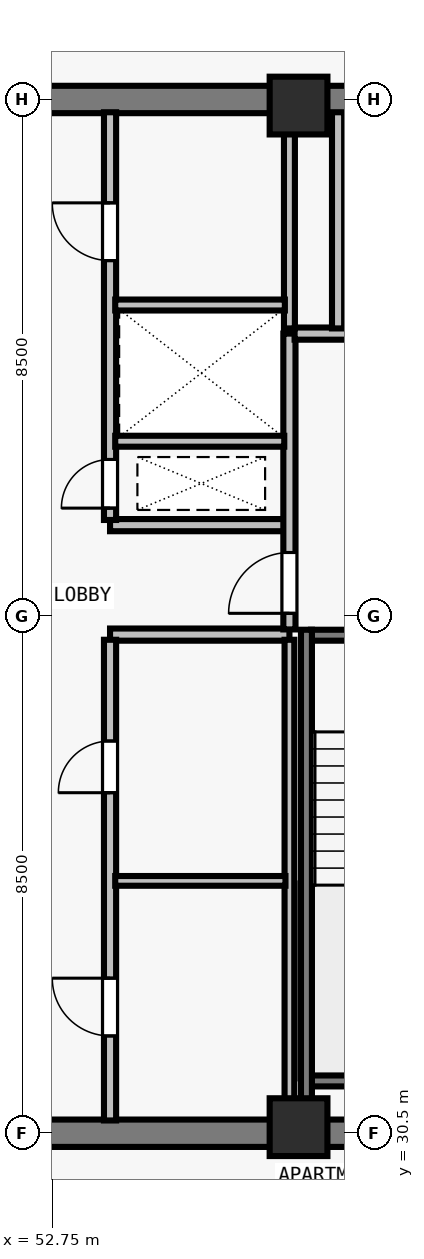
"""IFC4 building model, lengths in metres.
Left out: names, types, materials, properties, quantities, classifications, styles, units other than length and angle.
Written with IfcOpenShell. Run it as: python <this file> out.ifc"""

import sys

from ifc_helpers import new_model, si_unit, direction, frame, frame_2d, origin, origin_2d, place, context, subcontext, project, spatial, rectangle, extrude, element, fill, save


model = new_model("IFC4")
c1 = context("Model", 3, precision=1e-05, world=origin(), true_north=direction((0.0, 1.0)))
c2 = subcontext(c1, "Body", "Model", "MODEL_VIEW")
j1 = project(units=[si_unit("LENGTHUNIT", "METRE"), si_unit("PLANEANGLEUNIT", "RADIAN")], contexts=[c1])
p1 = place(None, origin())
s1 = spatial("IfcSite", under=j1, at=p1, CompositionType="ELEMENT")
p2 = place(p1, origin())
s2 = spatial("IfcBuilding", under=s1, at=p2, CompositionType="ELEMENT")
p3 = place(p2, frame((0.0, 0.0, 220.0)))
s3 = spatial("IfcBuildingStorey", under=s2, at=p3, CompositionType="ELEMENT", Elevation=220.0)
for number, where, z_axis, x_axis in (
    (1, (56.8, 30.6, 0.0), (0.0, 0.0, 1.0), (1.0, 0.0, 0.0)),
    (2, (56.8, 47.4, 0.0), (0.0, 0.0, 1.0), (1.0, 0.0, 0.0)),
):
    element("IfcColumn", number, at=place(p3, frame(where, z_axis=z_axis, x_axis=x_axis)), inside=s3, PredefinedType="COLUMN", context=c2, shape_type="SweptSolid", body=[
        extrude(rectangle(XDim=0.95, YDim=0.95, at=origin_2d()), origin(), (0.0, 0.0, 1.0), 3.5),
    ])
for number, where, z_axis, x_axis in (
    (3, (43.275, 30.5, 0.0), (0.0, 0.0, 1.0), (1.0, 0.0, 0.0)),
    (4, (43.275, 47.5, 0.0), (0.0, 0.0, 1.0), (1.0, 0.0, 0.0)),
):
    element("IfcWall", number, at=place(p3, frame(where, z_axis=z_axis, x_axis=x_axis)), inside=s3, PredefinedType="SHEAR", context=c2, shape_type="SweptSolid", body=[
        extrude(rectangle(XDim=17.45, YDim=0.45, at=frame_2d((8.725, 0.0))), origin(), (0.0, 0.0, 1.0), 3.29),
    ])
for number, where, z_axis, x_axis in (
    (5, (53.7, 38.7, 0.0), (0.0, 0.0, 1.0), (1.0, 0.0, 0.0)),
    (6, (53.7, 40.5, 0.0), (0.0, 0.0, 1.0), (1.0, 0.0, 0.0)),
):
    element("IfcWall", number, at=place(p3, frame(where, z_axis=z_axis, x_axis=x_axis)), inside=s3, PredefinedType="SOLIDWALL", context=c2, shape_type="SweptSolid", body=[
        extrude(rectangle(XDim=2.95, YDim=0.2, at=frame_2d((1.475, 0.0))), origin(), (0.0, 0.0, 1.0), 3.29),
    ])
p4 = place(p3, frame((53.7, 30.71, 0.0), z_axis=(0.0, 0.0, 1.0), x_axis=(0.0, 1.0, 0.0)))
e7 = element("IfcWall", 7, at=p4, inside=s3, PredefinedType="SOLIDWALL", context=c2, shape_type="SweptSolid", body=[
    extrude(rectangle(XDim=7.905, YDim=0.2, at=frame_2d((3.953, 0.0))), origin(), (0.0, 0.0, 1.0), 3.29),
])
p5 = place(p4, frame((1.39, 0.0, 0.0)))
e8 = element("IfcOpeningElement", 8, at=p5, cuts=e7, PredefinedType="OPENING", context=c2, shape_type="SweptSolid", body=[
    extrude(rectangle(XDim=0.95, YDim=2.12, at=frame_2d((0.475, 1.06))), frame((0.0, 0.11, 0.0), z_axis=(0.0, -1.0, 0.0), x_axis=(1.0, 0.0, 0.0)), (0.0, 0.0, 1.0), 0.22),
])
p6 = place(p4, frame((5.39, 0.0, 0.0)))
e9 = element("IfcOpeningElement", 9, at=p6, cuts=e7, PredefinedType="OPENING", context=c2, shape_type="SweptSolid", body=[
    extrude(rectangle(XDim=0.85, YDim=2.12, at=frame_2d((0.425, 1.06))), frame((0.0, 0.11, 0.0), z_axis=(0.0, -1.0, 0.0), x_axis=(1.0, 0.0, 0.0)), (0.0, 0.0, 1.0), 0.22),
])
p7 = place(p3, frame((53.7, 40.585, 0.0), z_axis=(0.0, 0.0, 1.0), x_axis=(0.0, 1.0, 0.0)))
e10 = element("IfcWall", 10, at=p7, inside=s3, PredefinedType="SOLIDWALL", context=c2, shape_type="SweptSolid", body=[
    extrude(rectangle(XDim=6.705, YDim=0.2, at=frame_2d((3.353, 0.0))), origin(), (0.0, 0.0, 1.0), 3.29),
])
p8 = place(p7, frame((0.195, 0.0, 0.0)))
e11 = element("IfcOpeningElement", 11, at=p8, cuts=e10, PredefinedType="OPENING", context=c2, shape_type="SweptSolid", body=[
    extrude(rectangle(XDim=0.8, YDim=2.08, at=frame_2d((0.4, 1.04))), frame((0.0, 0.11, 0.0), z_axis=(0.0, -1.0, 0.0), x_axis=(1.0, 0.0, 0.0)), (0.0, 0.0, 1.0), 0.22),
])
p9 = place(p7, frame((4.265, 0.0, 0.0)))
e12 = element("IfcOpeningElement", 12, at=p9, cuts=e10, PredefinedType="OPENING", context=c2, shape_type="SweptSolid", body=[
    extrude(rectangle(XDim=0.95, YDim=2.12, at=frame_2d((0.475, 1.06))), frame((0.0, 0.11, 0.0), z_axis=(0.0, -1.0, 0.0), x_axis=(1.0, 0.0, 0.0)), (0.0, 0.0, 1.0), 0.22),
])
p10 = place(p3, frame((56.65, 38.785, 0.0), z_axis=(0.0, 0.0, 1.0), x_axis=(0.0, 1.0, 0.0)))
e13 = element("IfcWall", 13, at=p10, inside=s3, PredefinedType="SOLIDWALL", context=c2, shape_type="SweptSolid", body=[
    extrude(rectangle(XDim=4.865, YDim=0.2, at=frame_2d((2.433, 0.0))), origin(), (0.0, 0.0, 1.0), 3.29),
])
p11 = place(p10, frame((0.265, 0.0, 0.0)))
e14 = element("IfcOpeningElement", 14, at=p11, cuts=e13, PredefinedType="OPENING", context=c2, shape_type="SweptSolid", body=[
    extrude(rectangle(XDim=1.0, YDim=2.15, at=frame_2d((0.5, 1.075))), frame((0.0, 0.11, 0.0), z_axis=(0.0, -1.0, 0.0), x_axis=(1.0, 0.0, 0.0)), (0.0, 0.0, 1.0), 0.22),
])
p12 = place(p3, frame((56.735, 43.65, 0.0), z_axis=(0.0, 0.0, 1.0), x_axis=(1.0, 0.0, 0.0)))
e15 = element("IfcWall", 15, at=p12, inside=s3, PredefinedType="SOLIDWALL", context=c2, shape_type="SweptSolid", body=[
    extrude(rectangle(XDim=3.555, YDim=0.2, at=frame_2d((1.777, 0.0))), origin(), (0.0, 0.0, 1.0), 3.29),
])
p13 = place(p12, frame((1.295, 0.0, 0.0)))
e16 = element("IfcOpeningElement", 16, at=p13, cuts=e15, PredefinedType="OPENING", context=c2, shape_type="SweptSolid", body=[
    extrude(rectangle(XDim=1.1, YDim=2.2, at=frame_2d((0.55, 1.1))), frame((0.0, 0.11, 0.0), z_axis=(0.0, -1.0, 0.0), x_axis=(1.0, 0.0, 0.0)), (0.0, 0.0, 1.0), 0.22),
])
p14 = place(p3, frame((57.45, 43.735, 0.0), z_axis=(0.0, 0.0, 1.0), x_axis=(0.0, 1.0, 0.0)))
e17 = element("IfcWall", 17, at=p14, inside=s3, PredefinedType="SOLIDWALL", context=c2, shape_type="SweptSolid", body=[
    extrude(rectangle(XDim=3.555, YDim=0.2, at=frame_2d((1.777, 0.0))), origin(), (0.0, 0.0, 1.0), 3.29),
])
p15 = place(p3, frame((56.65, 30.71, 0.0), z_axis=(0.0, 0.0, 1.0), x_axis=(0.0, 1.0, 0.0)))
e18 = element("IfcWall", 18, at=p15, inside=s3, PredefinedType="PARTITIONING", context=c2, shape_type="SweptSolid", body=[
    extrude(rectangle(XDim=7.905, YDim=0.16, at=frame_2d((3.953, 0.0))), origin(), (0.0, 0.0, 1.0), 3.29),
])
p16 = place(p3, frame((53.785, 34.65, 0.0), z_axis=(0.0, 0.0, 1.0), x_axis=(1.0, 0.0, 0.0)))
e19 = element("IfcWall", 19, at=p16, inside=s3, PredefinedType="PARTITIONING", context=c2, shape_type="SweptSolid", body=[
    extrude(rectangle(XDim=2.8, YDim=0.16, at=frame_2d((1.4, 0.0))), origin(), (0.0, 0.0, 1.0), 3.29),
])
p17 = place(p3, frame((56.65, 43.735, 0.0), z_axis=(0.0, 0.0, 1.0), x_axis=(0.0, 1.0, 0.0)))
e20 = element("IfcWall", 20, at=p17, inside=s3, PredefinedType="SOLIDWALL", context=c2, shape_type="SweptSolid", body=[
    extrude(rectangle(XDim=3.555, YDim=0.18, at=frame_2d((1.777, 0.0))), origin(), (0.0, 0.0, 1.0), 3.29),
])
p18 = place(p3, frame((53.785, 41.88, 0.0), z_axis=(0.0, 0.0, 1.0), x_axis=(1.0, 0.0, 0.0)))
e21 = element("IfcWall", 21, at=p18, inside=s3, PredefinedType="SOLIDWALL", context=c2, shape_type="SweptSolid", body=[
    extrude(rectangle(XDim=2.78, YDim=0.18, at=frame_2d((1.39, 0.0))), origin(), (0.0, 0.0, 1.0), 3.29),
])
p19 = place(p3, frame((53.785, 44.12, 0.0), z_axis=(0.0, 0.0, 1.0), x_axis=(1.0, 0.0, 0.0)))
e22 = element("IfcWall", 22, at=p19, inside=s3, PredefinedType="SOLIDWALL", context=c2, shape_type="SweptSolid", body=[
    extrude(rectangle(XDim=2.79, YDim=0.18, at=frame_2d((1.395, 0.0))), origin(), (0.0, 0.0, 1.0), 3.29),
])
p20 = place(p3, frame((57.005, 38.69, 0.0), z_axis=(0.0, 0.0, 1.0), x_axis=(1.0, 0.0, 0.0)))
e23 = element("IfcWall", 23, at=p20, inside=s3, PredefinedType="SOLIDWALL", context=c2, shape_type="SweptSolid", body=[
    extrude(rectangle(XDim=3.28, YDim=0.18, at=frame_2d((1.64, 0.0))), origin(), (0.0, 0.0, 1.0), 3.29),
])
p21 = place(p20, frame((1.165, 0.0, 0.0)))
e24 = element("IfcOpeningElement", 24, at=p21, cuts=e23, PredefinedType="OPENING", context=c2, shape_type="SweptSolid", body=[
    extrude(rectangle(XDim=0.95, YDim=2.15, at=frame_2d((0.475, 1.075))), frame((0.0, 0.1, 0.0), z_axis=(0.0, -1.0, 0.0), x_axis=(1.0, 0.0, 0.0)), (0.0, 0.0, 1.0), 0.2),
])
p22 = place(p3, frame((57.005, 31.36, 0.0), z_axis=(0.0, 0.0, 1.0), x_axis=(1.0, 0.0, 0.0)))
e25 = element("IfcWall", 25, at=p22, inside=s3, PredefinedType="SOLIDWALL", context=c2, shape_type="SweptSolid", body=[
    extrude(rectangle(XDim=3.28, YDim=0.18, at=frame_2d((1.64, 0.0))), origin(), (0.0, 0.0, 1.0), 3.29),
])
p23 = place(p3, frame((56.93, 38.78, 0.0), z_axis=(0.0, 0.0, 1.0), x_axis=(0.0, -1.0, 0.0)))
e26 = element("IfcWall", 26, at=p23, inside=s3, PredefinedType="SOLIDWALL", context=c2, shape_type="SweptSolid", body=[
    extrude(rectangle(XDim=8.067, YDim=0.18, at=frame_2d((4.034, 0.0))), origin(), (0.0, 0.0, 1.0), 3.29),
])
p24 = place(p11, origin())
e27 = element("IfcDoor", 27, at=p24, inside=s3, OperationType="SINGLE_SWING_LEFT", PredefinedType="DOOR", context=c2, shape_type="SweptSolid", body=[
    extrude(rectangle(XDim=1.0, YDim=2.15, at=frame_2d((0.5, 1.075))), frame((0.0, 0.025, 0.0), z_axis=(0.0, -1.0, 0.0), x_axis=(1.0, 0.0, 0.0)), (0.0, 0.0, 1.0), 0.05),
])
fill(e14, e27)
p25 = place(p5, origin())
e28 = element("IfcDoor", 28, at=p25, inside=s3, OperationType="SINGLE_SWING_RIGHT", PredefinedType="DOOR", context=c2, shape_type="SweptSolid", body=[
    extrude(rectangle(XDim=0.95, YDim=2.12, at=frame_2d((0.475, 1.06))), frame((0.0, 0.025, 0.0), z_axis=(0.0, -1.0, 0.0), x_axis=(1.0, 0.0, 0.0)), (0.0, 0.0, 1.0), 0.05),
])
fill(e8, e28)
p26 = place(p6, origin())
e29 = element("IfcDoor", 29, at=p26, inside=s3, OperationType="SINGLE_SWING_LEFT", PredefinedType="DOOR", context=c2, shape_type="SweptSolid", body=[
    extrude(rectangle(XDim=0.85, YDim=2.12, at=frame_2d((0.425, 1.06))), frame((0.0, 0.025, 0.0), z_axis=(0.0, -1.0, 0.0), x_axis=(1.0, 0.0, 0.0)), (0.0, 0.0, 1.0), 0.05),
])
fill(e9, e29)
p27 = place(p8, origin())
e30 = element("IfcDoor", 30, at=p27, inside=s3, OperationType="SINGLE_SWING_LEFT", PredefinedType="DOOR", context=c2, shape_type="SweptSolid", body=[
    extrude(rectangle(XDim=0.8, YDim=2.08, at=frame_2d((0.4, 1.04))), frame((0.0, 0.025, 0.0), z_axis=(0.0, -1.0, 0.0), x_axis=(1.0, 0.0, 0.0)), (0.0, 0.0, 1.0), 0.05),
])
fill(e11, e30)
p28 = place(p9, origin())
e31 = element("IfcDoor", 31, at=p28, inside=s3, OperationType="SINGLE_SWING_RIGHT", PredefinedType="DOOR", context=c2, shape_type="SweptSolid", body=[
    extrude(rectangle(XDim=0.95, YDim=2.12, at=frame_2d((0.475, 1.06))), frame((0.0, 0.025, 0.0), z_axis=(0.0, -1.0, 0.0), x_axis=(1.0, 0.0, 0.0)), (0.0, 0.0, 1.0), 0.05),
])
fill(e12, e31)
save(model, sys.argv[1])
